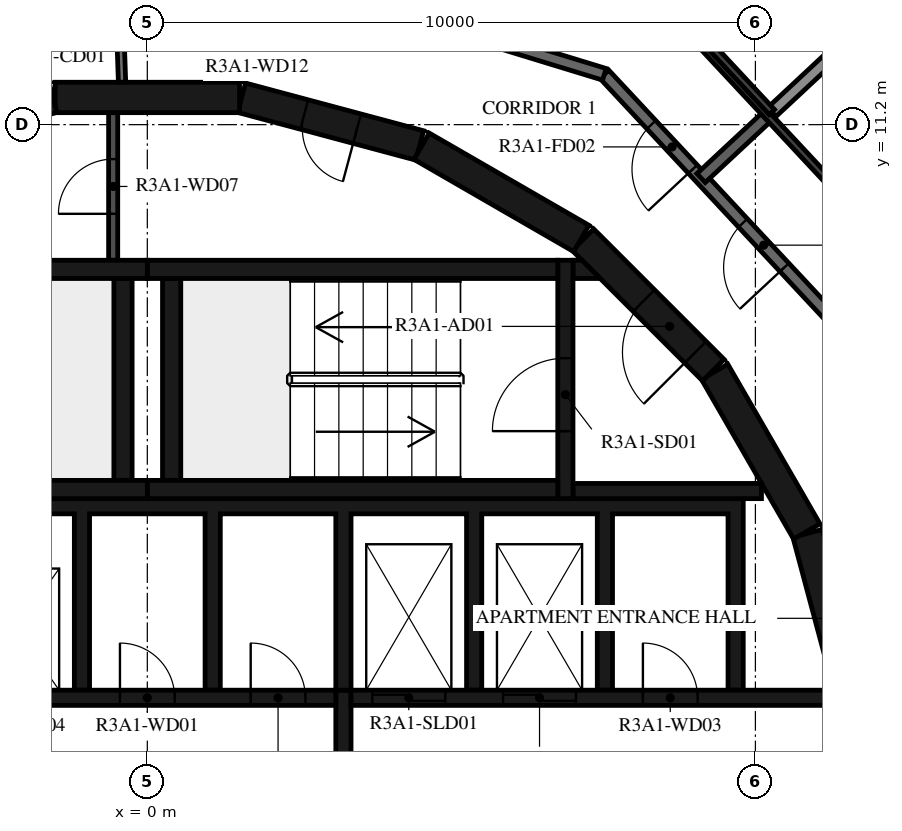
"""IFC4 building model, lengths in metres.
Left out: names, types, materials, properties, quantities, classifications, styles, units other than length and angle.
Written with IfcOpenShell. Run it as: python <this file> out.ifc"""

import sys

from ifc_helpers import new_model, si_unit, direction, frame, frame_2d, origin, place, context, subcontext, project, spatial, polyline, rectangle, outline, extrude, element, fill, save


model = new_model("IFC4")
c1 = context("Model", 3, precision=1e-05, world=origin(), true_north=direction((0.0, 1.0)))
c2 = subcontext(c1, "Body", "Model", "MODEL_VIEW")
j1 = project(units=[si_unit("LENGTHUNIT", "METRE"), si_unit("PLANEANGLEUNIT", "RADIAN")], contexts=[c1])
p1 = place(None, origin())
s1 = spatial("IfcSite", under=j1, at=p1, CompositionType="ELEMENT")
p2 = place(p1, origin())
s2 = spatial("IfcBuilding", under=s1, at=p2, CompositionType="ELEMENT")
p3 = place(p2, frame((0.0, 0.0, 116.9)))
s3 = spatial("IfcBuildingStorey", under=s2, at=p3, CompositionType="ELEMENT", Elevation=116.9)
for number, where, z_axis, x_axis in (
    (1, (11.643, 1.55, 0.0), (0.0, 0.0, 1.0), (-0.259, 0.966, 0.0)),
    (2, (10.845, 4.51, 0.0), (0.0, 0.0, 1.0), (-0.5, 0.866, 0.0)),
):
    element("IfcWall", number, at=place(p3, frame(where, z_axis=z_axis, x_axis=x_axis)), inside=s3, PredefinedType="SHEAR", context=c2, shape_type="SweptSolid", body=[
        extrude(rectangle(XDim=3.033, YDim=0.5, at=frame_2d((1.516, 0.0))), origin(), (0.0, 0.0, 1.0), 3.12),
    ])
p4 = place(p3, frame((9.308, 7.164, 0.0), z_axis=(0.0, 0.0, 1.0), x_axis=(-0.707106781187, 0.707106781187, 0.0)))
e3 = element("IfcWall", 3, at=p4, inside=s3, PredefinedType="SHEAR", context=c2, shape_type="SweptSolid", body=[
    extrude(rectangle(XDim=3.032, YDim=0.5, at=frame_2d((1.516, 0.0))), origin(), (0.0, 0.0, 1.0), 3.12),
])
p5 = place(p4, frame((0.416, 0.0, 0.0)))
e4 = element("IfcOpeningElement", 4, at=p5, cuts=e3, PredefinedType="OPENING", context=c2, shape_type="SweptSolid", body=[
    extrude(rectangle(XDim=1.2, YDim=2.1, at=frame_2d((0.6, 1.05))), frame((0.0, 0.26, 0.0), z_axis=(0.0, -1.0, 0.0), x_axis=(1.0, 0.0, 0.0)), (0.0, 0.0, 1.0), 0.52),
])
p6 = place(p3, frame((7.137, 9.329, 0.0), z_axis=(0.0, 0.0, 1.0), x_axis=(-0.865975092491, 0.500087131594, 0.0)))
e5 = element("IfcWall", 5, at=p6, inside=s3, PredefinedType="SHEAR", context=c2, shape_type="SweptSolid", body=[
    extrude(rectangle(XDim=3.033, YDim=0.5, at=frame_2d((1.516, 0.0))), origin(), (0.0, 0.0, 1.0), 3.12),
])
p7 = place(p3, frame((4.479, 10.858, 0.0), z_axis=(0.0, 0.0, 1.0), x_axis=(-0.965948410781, 0.258734743916, 0.0)))
e6 = element("IfcWall", 6, at=p7, inside=s3, PredefinedType="SHEAR", context=c2, shape_type="SweptSolid", body=[
    extrude(rectangle(XDim=3.033, YDim=0.5, at=frame_2d((1.516, 0.0))), origin(), (0.0, 0.0, 1.0), 3.12),
])
p8 = place(p7, frame((1.066, 0.0, 0.0)))
e7 = element("IfcOpeningElement", 7, at=p8, cuts=e6, PredefinedType="OPENING", context=c2, shape_type="SweptSolid", body=[
    extrude(rectangle(XDim=0.9, YDim=2.1, at=frame_2d((0.45, 1.05))), frame((0.0, 0.26, 0.0), z_axis=(0.0, -1.0, 0.0), x_axis=(1.0, 0.0, 0.0)), (0.0, 0.0, 1.0), 0.52),
])
for number, where, z_axis, x_axis in (
    (8, (1.516, 11.647, 0.0), (0.0, 0.0, 1.0), (-1.0, 0.0, 0.0)),
    (9, (-1.55, 11.643, 0.0), (0.0, 0.0, 1.0), (-0.966, -0.259, 0.0)),
):
    element("IfcWall", number, at=place(p3, frame(where, z_axis=z_axis, x_axis=x_axis)), inside=s3, PredefinedType="SHEAR", context=c2, shape_type="SweptSolid", body=[
        extrude(rectangle(XDim=3.033, YDim=0.5, at=frame_2d((1.516, 0.0))), origin(), (0.0, 0.0, 1.0), 3.12),
    ])
for number, where, z_axis, x_axis in (
    (10, (0.0, 5.2, 0.0), (0.0, 0.0, 1.0), (1.0, 0.0, 0.0)),
    (11, (0.0, 8.82, 0.0), (0.0, 0.0, 1.0), (1.0, 0.0, 0.0)),
):
    element("IfcWall", number, at=place(p3, frame(where, z_axis=z_axis, x_axis=x_axis)), inside=s3, PredefinedType="SHEAR", context=c2, shape_type="SweptSolid", body=[
        extrude(rectangle(XDim=6.75, YDim=0.3, at=frame_2d((3.375, 0.0))), origin(), (0.0, 0.0, 1.0), 3.12),
    ])
p9 = place(p3, frame((0.4, 5.35, 0.0), z_axis=(0.0, 0.0, 1.0), x_axis=(0.0, 1.0, 0.0)))
e12 = element("IfcWall", 12, at=p9, inside=s3, PredefinedType="SHEAR", context=c2, shape_type="SweptSolid", body=[
    extrude(rectangle(XDim=3.32, YDim=0.3, at=frame_2d((1.66, 0.0))), origin(), (0.0, 0.0, 1.0), 3.12),
])
p10 = place(p3, frame((6.875, 5.05, 0.0), z_axis=(0.0, 0.0, 1.0), x_axis=(0.0, 1.0, 0.0)))
e13 = element("IfcWall", 13, at=p10, inside=s3, PredefinedType="SHEAR", context=c2, shape_type="SweptSolid", body=[
    extrude(rectangle(XDim=3.92, YDim=0.25, at=frame_2d((1.96, 0.0))), origin(), (0.0, 0.0, 1.0), 3.12),
])
p11 = place(p10, frame((1.11, 0.0, 0.0)))
e14 = element("IfcOpeningElement", 14, at=p11, cuts=e13, PredefinedType="OPENING", context=c2, shape_type="SweptSolid", body=[
    extrude(rectangle(XDim=1.2, YDim=2.1, at=frame_2d((0.6, 1.05))), frame((0.0, 0.135, 0.0), z_axis=(0.0, -1.0, 0.0), x_axis=(1.0, 0.0, 0.0)), (0.0, 0.0, 1.0), 0.27),
])
p12 = place(p3, frame((7.0, 5.175, 0.0), z_axis=(0.0, 0.0, 1.0), x_axis=(1.0, 0.0, 0.0)))
e15 = element("IfcWall", 15, at=p12, inside=s3, PredefinedType="SHEAR", context=c2, shape_type="SweptSolid", body=[
    extrude(rectangle(XDim=3.1, YDim=0.25, at=frame_2d((1.55, 0.0))), origin(), (0.0, 0.0, 1.0), 3.12),
])
p13 = place(p3, origin())
e16 = element("IfcWall", 16, at=p13, inside=s3, PredefinedType="SHEAR", context=c2, shape_type="SweptSolid", body=[
    extrude(outline(polyline([(7.448, 8.67), (7.0, 8.67), (7.0, 8.97), (7.148, 8.97), (7.448, 8.67)])), origin(), (0.0, 0.0, 1.0), 3.12),
])
for number, where, z_axis, x_axis in (
    (17, (-6.75, 5.2, 0.0), (0.0, 0.0, 1.0), (1.0, 0.0, 0.0)),
    (18, (-6.75, 8.82, 0.0), (0.0, 0.0, 1.0), (1.0, 0.0, 0.0)),
):
    element("IfcWall", number, at=place(p3, frame(where, z_axis=z_axis, x_axis=x_axis)), inside=s3, PredefinedType="SHEAR", context=c2, shape_type="SweptSolid", body=[
        extrude(rectangle(XDim=6.75, YDim=0.3, at=frame_2d((3.375, 0.0))), origin(), (0.0, 0.0, 1.0), 3.12),
    ])
p14 = place(p3, frame((-0.4, 5.35, 0.0), z_axis=(0.0, 0.0, 1.0), x_axis=(0.0, 1.0, 0.0)))
e19 = element("IfcWall", 19, at=p14, inside=s3, PredefinedType="SHEAR", context=c2, shape_type="SweptSolid", body=[
    extrude(rectangle(XDim=3.32, YDim=0.3, at=frame_2d((1.66, 0.0))), origin(), (0.0, 0.0, 1.0), 3.12),
])
p15 = place(p3, origin())
e20 = element("IfcWall", 20, at=p15, inside=s3, PredefinedType="SHEAR", context=c2, shape_type="SweptSolid", body=[
    extrude(outline(polyline([(-9.55, 4.8), (-7.65, 4.8), (-7.65, 1.9), (-7.4, 1.9), (-7.4, 4.8), (-5.5, 4.8), (-5.5, 1.9), (-5.25, 1.9), (-5.25, 4.8), (-3.35, 4.8), (-3.35, 1.9), (-3.1, 1.9), (-3.1, 4.8), (-1.2, 4.8), (-1.2, 1.9), (-0.95, 1.9), (-0.95, 4.8), (0.95, 4.8), (0.95, 1.9), (1.2, 1.9), (1.2, 4.8), (3.1, 4.8), (3.1, 1.9), (3.35, 1.9), (3.35, 4.8), (5.25, 4.8), (5.25, 1.9), (5.5, 1.9), (5.5, 4.8), (7.4, 4.8), (7.4, 1.9), (7.65, 1.9), (7.65, 4.8), (9.55, 4.8), (9.55, 1.9), (9.8, 1.9), (9.8, 4.8), (9.8, 5.05), (-9.8, 5.05), (-9.8, 4.8), (-9.8, 1.9), (-9.55, 1.9), (-9.55, 4.8)])), origin(), (0.0, 0.0, 1.0), 3.12),
])
p16 = place(p3, frame((-11.28, 1.775, 0.0), z_axis=(0.0, 0.0, 1.0), x_axis=(1.0, 0.0, 0.0)))
e21 = element("IfcWall", 21, at=p16, inside=s3, PredefinedType="SHEAR", context=c2, shape_type="SweptSolid", body=[
    extrude(rectangle(XDim=14.38, YDim=0.25, at=frame_2d((7.19, 0.0))), origin(), (0.0, 0.0, 1.0), 3.12),
])
p17 = place(p16, frame((2.13, 0.0, 0.0)))
e22 = element("IfcOpeningElement", 22, at=p17, cuts=e21, PredefinedType="OPENING", context=c2, shape_type="SweptSolid", body=[
    extrude(rectangle(XDim=1.1, YDim=2.1, at=frame_2d((0.55, 1.05))), frame((0.0, 0.135, 0.0), z_axis=(0.0, -1.0, 0.0), x_axis=(1.0, 0.0, 0.0)), (0.0, 0.0, 1.0), 0.27),
])
p18 = place(p16, frame((4.28, 0.0, 0.0)))
e23 = element("IfcOpeningElement", 23, at=p18, cuts=e21, PredefinedType="OPENING", context=c2, shape_type="SweptSolid", body=[
    extrude(rectangle(XDim=1.1, YDim=2.1, at=frame_2d((0.55, 1.05))), frame((0.0, 0.135, 0.0), z_axis=(0.0, -1.0, 0.0), x_axis=(1.0, 0.0, 0.0)), (0.0, 0.0, 1.0), 0.27),
])
p19 = place(p16, frame((6.43, 0.0, 0.0)))
e24 = element("IfcOpeningElement", 24, at=p19, cuts=e21, PredefinedType="OPENING", context=c2, shape_type="SweptSolid", body=[
    extrude(rectangle(XDim=1.1, YDim=2.1, at=frame_2d((0.55, 1.05))), frame((0.0, 0.135, 0.0), z_axis=(0.0, -1.0, 0.0), x_axis=(1.0, 0.0, 0.0)), (0.0, 0.0, 1.0), 0.27),
])
p20 = place(p16, frame((8.58, 0.0, 0.0)))
e25 = element("IfcOpeningElement", 25, at=p20, cuts=e21, PredefinedType="OPENING", context=c2, shape_type="SweptSolid", body=[
    extrude(rectangle(XDim=1.1, YDim=2.1, at=frame_2d((0.55, 1.05))), frame((0.0, 0.135, 0.0), z_axis=(0.0, -1.0, 0.0), x_axis=(1.0, 0.0, 0.0)), (0.0, 0.0, 1.0), 0.27),
])
p21 = place(p16, frame((10.83, 0.0, 0.0)))
e26 = element("IfcOpeningElement", 26, at=p21, cuts=e21, PredefinedType="OPENING", context=c2, shape_type="SweptSolid", body=[
    extrude(rectangle(XDim=0.9, YDim=2.1, at=frame_2d((0.45, 1.05))), frame((0.0, 0.135, 0.0), z_axis=(0.0, -1.0, 0.0), x_axis=(1.0, 0.0, 0.0)), (0.0, 0.0, 1.0), 0.27),
])
p22 = place(p16, frame((12.98, 0.0, 0.0)))
e27 = element("IfcOpeningElement", 27, at=p22, cuts=e21, PredefinedType="OPENING", context=c2, shape_type="SweptSolid", body=[
    extrude(rectangle(XDim=0.9, YDim=2.1, at=frame_2d((0.45, 1.05))), frame((0.0, 0.135, 0.0), z_axis=(0.0, -1.0, 0.0), x_axis=(1.0, 0.0, 0.0)), (0.0, 0.0, 1.0), 0.27),
])
p23 = place(p3, frame((3.35, 1.775, 0.0), z_axis=(0.0, 0.0, 1.0), x_axis=(1.0, 0.0, 0.0)))
e28 = element("IfcWall", 28, at=p23, inside=s3, PredefinedType="SHEAR", context=c2, shape_type="SweptSolid", body=[
    extrude(rectangle(XDim=7.93, YDim=0.25, at=frame_2d((3.965, 0.0))), origin(), (0.0, 0.0, 1.0), 3.12),
])
p24 = place(p23, frame((0.35, 0.0, 0.0)))
e29 = element("IfcOpeningElement", 29, at=p24, cuts=e28, PredefinedType="OPENING", context=c2, shape_type="SweptSolid", body=[
    extrude(rectangle(XDim=1.2, YDim=2.4, at=frame_2d((0.6, 1.2))), frame((0.0, 0.135, 0.0), z_axis=(0.0, -1.0, 0.0), x_axis=(1.0, 0.0, 0.0)), (0.0, 0.0, 1.0), 0.27),
])
p25 = place(p23, frame((2.5, 0.0, 0.0)))
e30 = element("IfcOpeningElement", 30, at=p25, cuts=e28, PredefinedType="OPENING", context=c2, shape_type="SweptSolid", body=[
    extrude(rectangle(XDim=1.2, YDim=2.4, at=frame_2d((0.6, 1.2))), frame((0.0, 0.135, 0.0), z_axis=(0.0, -1.0, 0.0), x_axis=(1.0, 0.0, 0.0)), (0.0, 0.0, 1.0), 0.27),
])
p26 = place(p23, frame((4.8, 0.0, 0.0)))
e31 = element("IfcOpeningElement", 31, at=p26, cuts=e28, PredefinedType="OPENING", context=c2, shape_type="SweptSolid", body=[
    extrude(rectangle(XDim=0.9, YDim=2.1, at=frame_2d((0.45, 1.05))), frame((0.0, 0.135, 0.0), z_axis=(0.0, -1.0, 0.0), x_axis=(1.0, 0.0, 0.0)), (0.0, 0.0, 1.0), 0.27),
])
p27 = place(p3, frame((3.225, -1.9, 0.0), z_axis=(0.0, 0.0, 1.0), x_axis=(0.0, 1.0, 0.0)))
e32 = element("IfcWall", 32, at=p27, inside=s3, PredefinedType="SHEAR", context=c2, shape_type="SweptSolid", body=[
    extrude(rectangle(XDim=3.8, YDim=0.25, at=frame_2d((1.9, 0.0))), origin(), (0.0, 0.0, 1.0), 3.12),
])
p28 = place(p3, frame((-0.562, 8.97, 0.0), z_axis=(0.0, 0.0, 1.0), x_axis=(0.0, 1.0, 0.0)))
e33 = element("IfcWall", 33, at=p28, inside=s3, PredefinedType="PARTITIONING", context=c2, shape_type="SweptSolid", body=[
    extrude(rectangle(XDim=2.427, YDim=0.15, at=frame_2d((1.214, 0.0))), origin(), (0.0, 0.0, 1.0), 3.12),
])
p29 = place(p28, frame((0.764, 0.0, 0.0)))
e34 = element("IfcOpeningElement", 34, at=p29, cuts=e33, PredefinedType="OPENING", context=c2, shape_type="SweptSolid", body=[
    extrude(rectangle(XDim=0.9, YDim=2.1, at=frame_2d((0.45, 1.05))), frame((0.0, 0.085, 0.0), z_axis=(0.0, -1.0, 0.0), x_axis=(1.0, 0.0, 0.0)), (0.0, 0.0, 1.0), 0.17),
])
p30 = place(p3, frame((-0.487, 13.948, 0.0), z_axis=(0.0, 0.0, 1.0), x_axis=(0.034859752231, -0.999392214135, 0.0)))
e35 = element("IfcWall", 35, at=p30, inside=s3, PredefinedType="PARTITIONING", context=c2, shape_type="SweptSolid", body=[
    extrude(rectangle(XDim=2.052, YDim=0.12, at=frame_2d((1.026, 0.0))), origin(), (0.0, 0.0, 1.0), 3.12),
])
p31 = place(p30, frame((0.125, 0.0, 0.0)))
e36 = element("IfcOpeningElement", 36, at=p31, cuts=e35, PredefinedType="OPENING", context=c2, shape_type="SweptSolid", body=[
    extrude(rectangle(XDim=1.2, YDim=2.1, at=frame_2d((0.6, 1.05))), frame((0.0, 0.07, 0.0), z_axis=(0.0, -1.0, 0.0), x_axis=(1.0, 0.0, 0.0)), (0.0, 0.0, 1.0), 0.14),
])
p32 = place(p3, frame((12.523, 6.659, 0.0), z_axis=(0.0, 0.0, 1.0), x_axis=(-0.682001841105, 0.731350455479, 0.0)))
e37 = element("IfcWall", 37, at=p32, inside=s3, PredefinedType="STANDARD", context=c2, shape_type="SweptSolid", body=[
    extrude(rectangle(XDim=7.342, YDim=0.2, at=frame_2d((3.671, 0.0))), origin(), (0.0, 0.0, 1.0), 3.12),
])
p33 = place(p32, frame((3.0, 0.0, 0.0)))
e38 = element("IfcOpeningElement", 38, at=p33, cuts=e37, PredefinedType="OPENING", context=c2, shape_type="SweptSolid", body=[
    extrude(rectangle(XDim=1.0, YDim=2.1, at=frame_2d((0.5, 1.05))), frame((0.0, 0.11, 0.0), z_axis=(0.0, -1.0, 0.0), x_axis=(1.0, 0.0, 0.0)), (0.0, 0.0, 1.0), 0.22),
])
p34 = place(p32, frame((5.209, 0.0, 0.0)))
e39 = element("IfcOpeningElement", 39, at=p34, cuts=e37, PredefinedType="OPENING", context=c2, shape_type="SweptSolid", body=[
    extrude(rectangle(XDim=1.0, YDim=2.1, at=frame_2d((0.5, 1.05))), frame((0.0, 0.11, 0.0), z_axis=(0.0, -1.0, 0.0), x_axis=(1.0, 0.0, 0.0)), (0.0, 0.0, 1.0), 0.22),
])
p35 = place(p3, frame((7.516, 12.028, 0.0), z_axis=(0.0, 0.0, 1.0), x_axis=(-0.956306642771, 0.292365533182, 0.0)))
e40 = element("IfcWall", 40, at=p35, inside=s3, PredefinedType="STANDARD", context=c2, shape_type="SweptSolid", body=[
    extrude(rectangle(XDim=7.342, YDim=0.2, at=frame_2d((3.671, 0.0))), origin(), (0.0, 0.0, 1.0), 3.12),
])
p36 = place(p3, frame((10.233, 11.372, 0.0), z_axis=(0.0, 0.0, 1.0), x_axis=(-0.731329353292, -0.682024469513, 0.0)))
e41 = element("IfcWall", 41, at=p36, inside=s3, PredefinedType="STANDARD", context=c2, shape_type="SweptSolid", body=[
    extrude(rectangle(XDim=1.54, YDim=0.2, at=frame_2d((0.77, 0.0))), origin(), (0.0, 0.0, 1.0), 3.12),
])
p37 = place(p3, frame((12.903, 13.862, 0.0), z_axis=(0.0, 0.0, 1.0), x_axis=(-0.731328084739, -0.682025829769, 0.0)))
e42 = element("IfcWall", 42, at=p37, inside=s3, PredefinedType="STANDARD", context=c2, shape_type="SweptSolid", body=[
    extrude(rectangle(XDim=3.6, YDim=0.2, at=frame_2d((1.8, 0.0))), origin(), (0.0, 0.0, 1.0), 2.73),
])
p38 = place(p3, frame((13.894, 7.388, 0.0), z_axis=(0.0, 0.0, 1.0), x_axis=(-0.681994622729, 0.731357186721, 0.0)))
e43 = element("IfcWall", 43, at=p38, inside=s3, PredefinedType="PARTITIONING", context=c2, shape_type="SweptSolid", body=[
    extrude(rectangle(XDim=8.146, YDim=0.12, at=frame_2d((4.073, 0.0))), origin(), (0.0, 0.0, 1.0), 3.12),
])
p39 = place(p38, frame((0.2, 0.0, 0.0)))
e44 = element("IfcOpeningElement", 44, at=p39, cuts=e43, PredefinedType="OPENING", context=c2, shape_type="SweptSolid", body=[
    extrude(rectangle(XDim=0.9, YDim=2.1, at=frame_2d((0.45, 1.05))), frame((0.0, 0.07, 0.0), z_axis=(0.0, -1.0, 0.0), x_axis=(1.0, 0.0, 0.0)), (0.0, 0.0, 1.0), 0.14),
])
p40 = place(p3, frame((-1.539, 24.071, 0.0), z_axis=(0.0, 0.0, 1.0), x_axis=(0.68200220595, -0.731350115252, 0.0)))
e45 = element("IfcWall", 45, at=p40, inside=s3, PredefinedType="PARTITIONING", context=c2, shape_type="SweptSolid", body=[
    extrude(rectangle(XDim=17.316, YDim=0.12, at=frame_2d((8.658, 0.0))), origin(), (0.0, 0.0, 1.0), 3.12),
])
p41 = place(p40, frame((3.323, 0.0, 0.0)))
e46 = element("IfcOpeningElement", 46, at=p41, cuts=e45, PredefinedType="OPENING", context=c2, shape_type="SweptSolid", body=[
    extrude(rectangle(XDim=0.9, YDim=2.1, at=frame_2d((0.45, 1.05))), frame((0.0, 0.07, 0.0), z_axis=(0.0, -1.0, 0.0), x_axis=(1.0, 0.0, 0.0)), (0.0, 0.0, 1.0), 0.14),
])
p42 = place(p40, frame((1.417, 0.0, 0.0)))
e47 = element("IfcOpeningElement", 47, at=p42, cuts=e45, PredefinedType="OPENING", context=c2, shape_type="SweptSolid", body=[
    extrude(rectangle(XDim=0.9, YDim=2.1, at=frame_2d((0.45, 1.05))), frame((0.0, 0.07, 0.0), z_axis=(0.0, -1.0, 0.0), x_axis=(1.0, 0.0, 0.0)), (0.0, 0.0, 1.0), 0.14),
])
p43 = place(p11, origin())
e48 = element("IfcDoor", 48, at=p43, inside=s3, OperationType="SINGLE_SWING_LEFT", PredefinedType="DOOR", context=c2, shape_type="SweptSolid", body=[
    extrude(rectangle(XDim=1.2, YDim=2.1, at=frame_2d((0.6, 1.05))), frame((0.0, 0.025, 0.0), z_axis=(0.0, -1.0, 0.0), x_axis=(1.0, 0.0, 0.0)), (0.0, 0.0, 1.0), 0.05),
])
fill(e14, e48)
p44 = place(p5, origin())
e49 = element("IfcDoor", 49, at=p44, inside=s3, OperationType="SINGLE_SWING_RIGHT", PredefinedType="DOOR", context=c2, shape_type="SweptSolid", body=[
    extrude(rectangle(XDim=1.2, YDim=2.1, at=frame_2d((0.6, 1.05))), frame((0.0, 0.025, 0.0), z_axis=(0.0, -1.0, 0.0), x_axis=(1.0, 0.0, 0.0)), (0.0, 0.0, 1.0), 0.05),
])
fill(e4, e49)
p45 = place(p24, origin())
e50 = element("IfcDoor", 50, at=p45, inside=s3, OperationType="DOUBLE_DOOR_SLIDING", PredefinedType="DOOR", context=c2, shape_type="SweptSolid", body=[
    extrude(rectangle(XDim=1.2, YDim=2.4, at=frame_2d((0.6, 1.2))), frame((0.0, 0.025, 0.0), z_axis=(0.0, -1.0, 0.0), x_axis=(1.0, 0.0, 0.0)), (0.0, 0.0, 1.0), 0.05),
])
fill(e29, e50)
p46 = place(p25, origin())
e51 = element("IfcDoor", 51, at=p46, inside=s3, OperationType="DOUBLE_DOOR_SLIDING", PredefinedType="DOOR", context=c2, shape_type="SweptSolid", body=[
    extrude(rectangle(XDim=1.2, YDim=2.4, at=frame_2d((0.6, 1.2))), frame((0.0, 0.025, 0.0), z_axis=(0.0, -1.0, 0.0), x_axis=(1.0, 0.0, 0.0)), (0.0, 0.0, 1.0), 0.05),
])
fill(e30, e51)
p47 = place(p21, origin())
e52 = element("IfcDoor", 52, at=p47, inside=s3, OperationType="SINGLE_SWING_RIGHT", PredefinedType="DOOR", context=c2, shape_type="SweptSolid", body=[
    extrude(rectangle(XDim=0.9, YDim=2.1, at=frame_2d((0.45, 1.05))), frame((0.0, 0.025, 0.0), z_axis=(0.0, -1.0, 0.0), x_axis=(1.0, 0.0, 0.0)), (0.0, 0.0, 1.0), 0.05),
])
fill(e26, e52)
p48 = place(p22, origin())
e53 = element("IfcDoor", 53, at=p48, inside=s3, OperationType="SINGLE_SWING_LEFT", PredefinedType="DOOR", context=c2, shape_type="SweptSolid", body=[
    extrude(rectangle(XDim=0.9, YDim=2.1, at=frame_2d((0.45, 1.05))), frame((0.0, 0.025, 0.0), z_axis=(0.0, -1.0, 0.0), x_axis=(1.0, 0.0, 0.0)), (0.0, 0.0, 1.0), 0.05),
])
fill(e27, e53)
p49 = place(p26, origin())
e54 = element("IfcDoor", 54, at=p49, inside=s3, OperationType="SINGLE_SWING_RIGHT", PredefinedType="DOOR", context=c2, shape_type="SweptSolid", body=[
    extrude(rectangle(XDim=0.9, YDim=2.1, at=frame_2d((0.45, 1.05))), frame((0.0, 0.025, 0.0), z_axis=(0.0, -1.0, 0.0), x_axis=(1.0, 0.0, 0.0)), (0.0, 0.0, 1.0), 0.05),
])
fill(e31, e54)
p50 = place(p29, origin())
e55 = element("IfcDoor", 55, at=p50, inside=s3, OperationType="SINGLE_SWING_RIGHT", PredefinedType="DOOR", context=c2, shape_type="SweptSolid", body=[
    extrude(rectangle(XDim=0.9, YDim=2.1, at=frame_2d((0.45, 1.05))), frame((0.0, 0.025, 0.0), z_axis=(0.0, -1.0, 0.0), x_axis=(1.0, 0.0, 0.0)), (0.0, 0.0, 1.0), 0.05),
])
fill(e34, e55)
p51 = place(p8, origin())
e56 = element("IfcDoor", 56, at=p51, inside=s3, OperationType="SINGLE_SWING_LEFT", PredefinedType="DOOR", context=c2, shape_type="SweptSolid", body=[
    extrude(rectangle(XDim=0.9, YDim=2.1, at=frame_2d((0.45, 1.05))), frame((0.0, 0.025, 0.0), z_axis=(0.0, -1.0, 0.0), x_axis=(1.0, 0.0, 0.0)), (0.0, 0.0, 1.0), 0.05),
])
fill(e7, e56)
p52 = place(p33, origin())
e57 = element("IfcDoor", 57, at=p52, inside=s3, OperationType="SINGLE_SWING_LEFT", PredefinedType="DOOR", context=c2, shape_type="SweptSolid", body=[
    extrude(rectangle(XDim=1.0, YDim=2.1, at=frame_2d((0.5, 1.05))), frame((0.0, 0.025, 0.0), z_axis=(0.0, -1.0, 0.0), x_axis=(1.0, 0.0, 0.0)), (0.0, 0.0, 1.0), 0.05),
])
fill(e38, e57)
p53 = place(p34, origin())
e58 = element("IfcDoor", 58, at=p53, inside=s3, OperationType="SINGLE_SWING_RIGHT", PredefinedType="DOOR", context=c2, shape_type="SweptSolid", body=[
    extrude(rectangle(XDim=1.0, YDim=2.1, at=frame_2d((0.5, 1.05))), frame((0.0, 0.025, 0.0), z_axis=(0.0, -1.0, 0.0), x_axis=(1.0, 0.0, 0.0)), (0.0, 0.0, 1.0), 0.05),
])
fill(e39, e58)
save(model, sys.argv[1])
